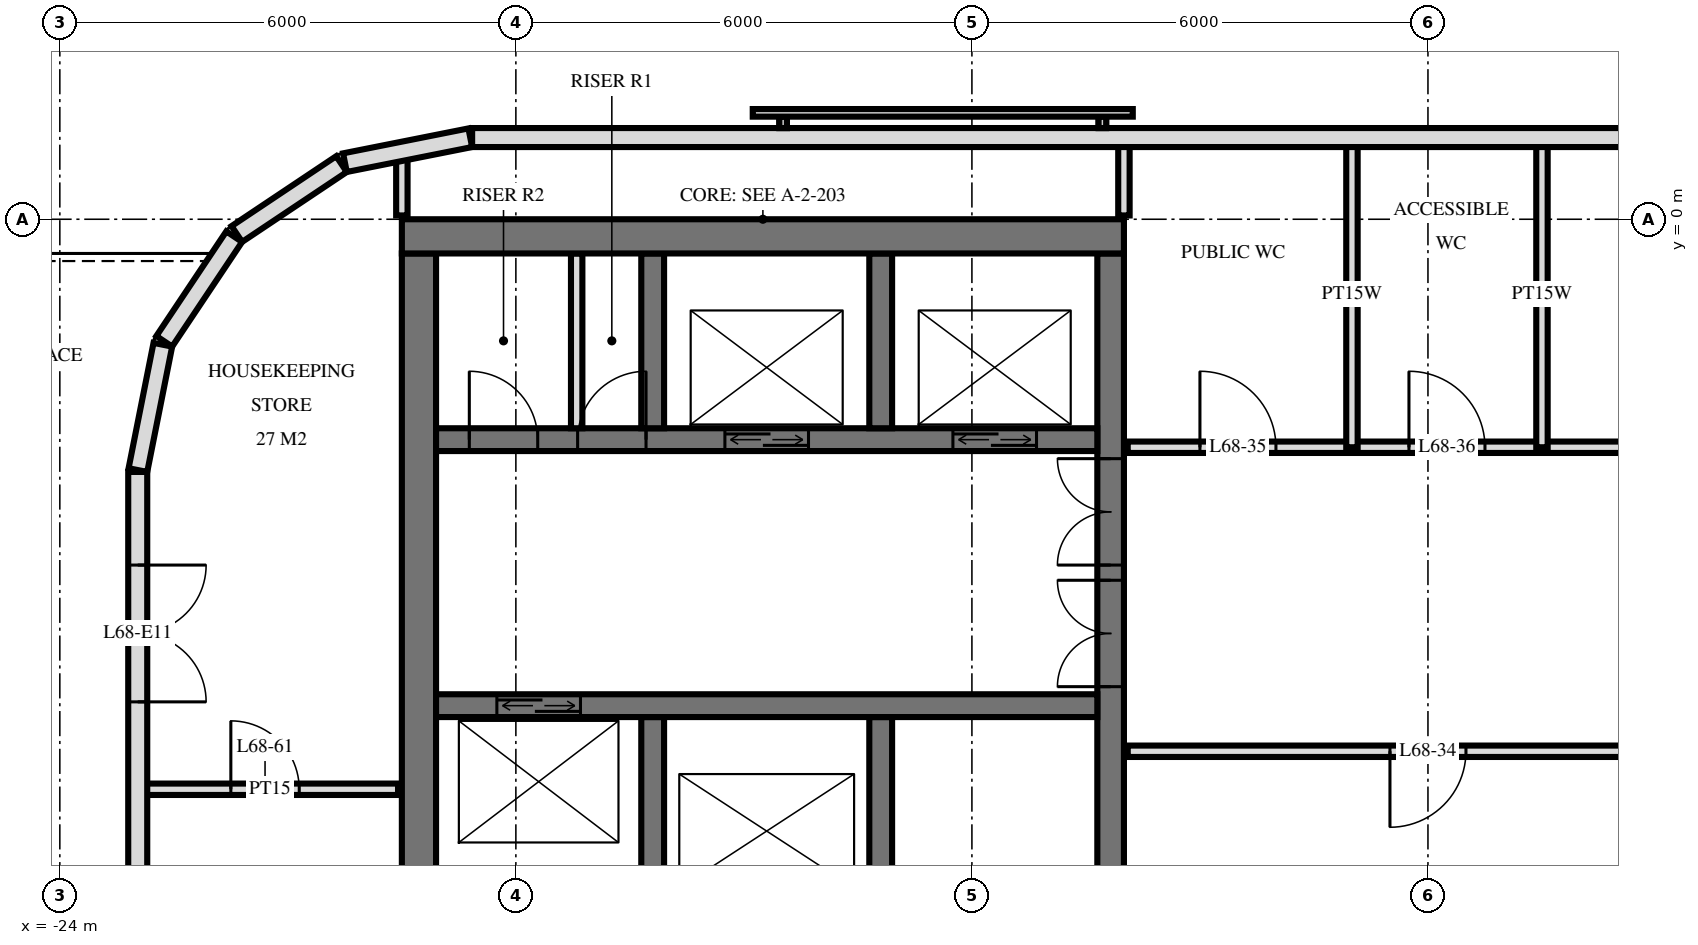
"""IFC4 building model, lengths in metres.
Left out: names, types, materials, properties, quantities, classifications, styles, units other than length and angle.
Written with IfcOpenShell. Run it as: python <this file> out.ifc"""

import sys

from ifc_helpers import new_model, si_unit, direction, frame, frame_2d, origin, place, context, subcontext, project, spatial, rectangle, extrude, element, fill, save


model = new_model("IFC4")
c1 = context("Model", 3, precision=1e-05, world=origin(), true_north=direction((0.0, 1.0)))
c2 = subcontext(c1, "Body", "Model", "MODEL_VIEW")
j1 = project(units=[si_unit("LENGTHUNIT", "METRE"), si_unit("PLANEANGLEUNIT", "RADIAN")], contexts=[c1])
p1 = place(None, origin())
s1 = spatial("IfcSite", under=j1, at=p1, CompositionType="ELEMENT")
p2 = place(p1, origin())
s2 = spatial("IfcBuilding", under=s1, at=p2, CompositionType="ELEMENT")
p3 = place(p2, frame((0.0, 0.0, 259.6)))
s3 = spatial("IfcBuildingStorey", under=s2, at=p3, CompositionType="ELEMENT", Elevation=259.6)
p4 = place(p3, frame((-19.5, -0.225, 0.0), z_axis=(0.0, 0.0, 1.0), x_axis=(1.0, 0.0, 0.0)))
e1 = element("IfcWall", 1, at=p4, inside=s3, PredefinedType="SHEAR", context=c2, shape_type="SweptSolid", body=[
    extrude(rectangle(XDim=9.5, YDim=0.45, at=frame_2d((4.75, 0.0))), origin(), (0.0, 0.0, 1.0), 3.5),
])
p5 = place(p3, frame((-10.175, -14.55, 0.0), z_axis=(0.0, 0.0, 1.0), x_axis=(0.0, 1.0, 0.0)))
e2 = element("IfcWall", 2, at=p5, inside=s3, PredefinedType="SHEAR", context=c2, shape_type="SweptSolid", body=[
    extrude(rectangle(XDim=14.1, YDim=0.35, at=frame_2d((7.05, 0.0))), origin(), (0.0, 0.0, 1.0), 3.5),
])
p6 = place(p5, frame((8.4, 0.0, 0.0)))
e3 = element("IfcOpeningElement", 3, at=p6, cuts=e2, PredefinedType="OPENING", context=c2, shape_type="SweptSolid", body=[
    extrude(rectangle(XDim=1.4, YDim=2.4, at=frame_2d((0.7, 1.2))), frame((0.0, 0.185, 0.0), z_axis=(0.0, -1.0, 0.0), x_axis=(1.0, 0.0, 0.0)), (0.0, 0.0, 1.0), 0.37),
])
p7 = place(p5, frame((10.0, 0.0, 0.0)))
e4 = element("IfcOpeningElement", 4, at=p7, cuts=e2, PredefinedType="OPENING", context=c2, shape_type="SweptSolid", body=[
    extrude(rectangle(XDim=1.4, YDim=2.4, at=frame_2d((0.7, 1.2))), frame((0.0, 0.185, 0.0), z_axis=(0.0, -1.0, 0.0), x_axis=(1.0, 0.0, 0.0)), (0.0, 0.0, 1.0), 0.37),
])
p8 = place(p5, frame((4.0, 0.0, 0.0)))
e5 = element("IfcOpeningElement", 5, at=p8, cuts=e2, PredefinedType="OPENING", context=c2, shape_type="SweptSolid", body=[
    extrude(rectangle(XDim=1.2, YDim=2.1, at=frame_2d((0.6, 1.05))), frame((0.0, 0.185, 0.0), z_axis=(0.0, -1.0, 0.0), x_axis=(1.0, 0.0, 0.0)), (0.0, 0.0, 1.0), 0.37),
])
p9 = place(p3, frame((-19.275, -14.55, 0.0), z_axis=(0.0, 0.0, 1.0), x_axis=(0.0, 1.0, 0.0)))
e6 = element("IfcWall", 6, at=p9, inside=s3, PredefinedType="SHEAR", context=c2, shape_type="SweptSolid", body=[
    extrude(rectangle(XDim=14.1, YDim=0.45, at=frame_2d((7.05, 0.0))), origin(), (0.0, 0.0, 1.0), 3.5),
])
p10 = place(p3, frame((-19.05, -2.9, 0.0), z_axis=(0.0, 0.0, 1.0), x_axis=(1.0, 0.0, 0.0)))
e7 = element("IfcWall", 7, at=p10, inside=s3, PredefinedType="SHEAR", context=c2, shape_type="SweptSolid", body=[
    extrude(rectangle(XDim=8.7, YDim=0.3, at=frame_2d((4.35, 0.0))), origin(), (0.0, 0.0, 1.0), 3.5),
])
p11 = place(p10, frame((6.8, 0.0, 0.0)))
e8 = element("IfcOpeningElement", 8, at=p11, cuts=e7, PredefinedType="OPENING", context=c2, shape_type="SweptSolid", body=[
    extrude(rectangle(XDim=1.1, YDim=2.1, at=frame_2d((0.55, 1.05))), frame((0.0, 0.16, 0.0), z_axis=(0.0, -1.0, 0.0), x_axis=(1.0, 0.0, 0.0)), (0.0, 0.0, 1.0), 0.32),
])
p12 = place(p10, frame((3.8, 0.0, 0.0)))
e9 = element("IfcOpeningElement", 9, at=p12, cuts=e7, PredefinedType="OPENING", context=c2, shape_type="SweptSolid", body=[
    extrude(rectangle(XDim=1.1, YDim=2.1, at=frame_2d((0.55, 1.05))), frame((0.0, 0.16, 0.0), z_axis=(0.0, -1.0, 0.0), x_axis=(1.0, 0.0, 0.0)), (0.0, 0.0, 1.0), 0.32),
])
p13 = place(p10, frame((1.863, 0.0, 0.0)))
e10 = element("IfcOpeningElement", 10, at=p13, cuts=e7, PredefinedType="OPENING", context=c2, shape_type="SweptSolid", body=[
    extrude(rectangle(XDim=0.9, YDim=2.1, at=frame_2d((0.45, 1.05))), frame((0.0, 0.16, 0.0), z_axis=(0.0, -1.0, 0.0), x_axis=(1.0, 0.0, 0.0)), (0.0, 0.0, 1.0), 0.32),
])
p14 = place(p10, frame((0.438, 0.0, 0.0)))
e11 = element("IfcOpeningElement", 11, at=p14, cuts=e7, PredefinedType="OPENING", context=c2, shape_type="SweptSolid", body=[
    extrude(rectangle(XDim=0.9, YDim=2.1, at=frame_2d((0.45, 1.05))), frame((0.0, 0.16, 0.0), z_axis=(0.0, -1.0, 0.0), x_axis=(1.0, 0.0, 0.0)), (0.0, 0.0, 1.0), 0.32),
])
p15 = place(p3, frame((-19.05, -6.4, 0.0), z_axis=(0.0, 0.0, 1.0), x_axis=(1.0, 0.0, 0.0)))
e12 = element("IfcWall", 12, at=p15, inside=s3, PredefinedType="SHEAR", context=c2, shape_type="SweptSolid", body=[
    extrude(rectangle(XDim=8.7, YDim=0.3, at=frame_2d((4.35, 0.0))), origin(), (0.0, 0.0, 1.0), 3.5),
])
p16 = place(p15, frame((0.8, 0.0, 0.0)))
e13 = element("IfcOpeningElement", 13, at=p16, cuts=e12, PredefinedType="OPENING", context=c2, shape_type="SweptSolid", body=[
    extrude(rectangle(XDim=1.1, YDim=2.1, at=frame_2d((0.55, 1.05))), frame((0.0, 0.16, 0.0), z_axis=(0.0, -1.0, 0.0), x_axis=(1.0, 0.0, 0.0)), (0.0, 0.0, 1.0), 0.32),
])
for number, where, z_axis, x_axis in (
    (14, (-13.2, -2.75, 0.0), (0.0, 0.0, 1.0), (0.0, 1.0, 0.0)),
    (15, (-13.2, -8.85, 0.0), (0.0, 0.0, 1.0), (0.0, 1.0, 0.0)),
    (16, (-16.2, -2.75, 0.0), (0.0, 0.0, 1.0), (0.0, 1.0, 0.0)),
    (17, (-16.2, -8.85, 0.0), (0.0, 0.0, 1.0), (0.0, 1.0, 0.0)),
):
    element("IfcWall", number, at=place(p3, frame(where, z_axis=z_axis, x_axis=x_axis)), inside=s3, PredefinedType="SHEAR", context=c2, shape_type="SweptSolid", body=[
        extrude(rectangle(XDim=2.3, YDim=0.3, at=frame_2d((1.15, 0.0))), origin(), (0.0, 0.0, 1.0), 3.5),
    ])
p17 = place(p3, frame((18.575, 1.075, 0.0), z_axis=(0.0, 0.0, 1.0), x_axis=(-1.0, 0.0, 0.0)))
e18 = element("IfcWall", 18, at=p17, inside=s3, PredefinedType="SOLIDWALL", context=c2, shape_type="SweptSolid", body=[
    extrude(rectangle(XDim=37.151, YDim=0.25, at=frame_2d((18.575, 0.0))), origin(), (0.0, 0.0, 1.0), 3.22),
])
p18 = place(p17, frame((9.275, 0.0, 0.9)))
e19 = element("IfcOpeningElement", 19, at=p18, cuts=e18, PredefinedType="OPENING", context=c2, shape_type="SweptSolid", body=[
    extrude(rectangle(XDim=2.4, YDim=1.5, at=frame_2d((1.2, 0.75))), frame((0.0, 0.135, 0.0), z_axis=(0.0, -1.0, 0.0), x_axis=(1.0, 0.0, 0.0)), (0.0, 0.0, 1.0), 0.27),
])
p19 = place(p17, frame((12.275, 0.0, 0.9)))
e20 = element("IfcOpeningElement", 20, at=p19, cuts=e18, PredefinedType="OPENING", context=c2, shape_type="SweptSolid", body=[
    extrude(rectangle(XDim=2.4, YDim=1.5, at=frame_2d((1.2, 0.75))), frame((0.0, 0.135, 0.0), z_axis=(0.0, -1.0, 0.0), x_axis=(1.0, 0.0, 0.0)), (0.0, 0.0, 1.0), 0.27),
])
p20 = place(p17, frame((18.275, 0.0, 0.9)))
e21 = element("IfcOpeningElement", 21, at=p20, cuts=e18, PredefinedType="OPENING", context=c2, shape_type="SweptSolid", body=[
    extrude(rectangle(XDim=2.4, YDim=1.5, at=frame_2d((1.2, 0.75))), frame((0.0, 0.135, 0.0), z_axis=(0.0, -1.0, 0.0), x_axis=(1.0, 0.0, 0.0)), (0.0, 0.0, 1.0), 0.27),
])
p21 = place(p3, frame((-18.6, 1.073, 0.0), z_axis=(0.0, 0.0, 1.0), x_axis=(-0.980797896849, -0.195026884138, 0.0)))
e22 = element("IfcWall", 22, at=p21, inside=s3, PredefinedType="SOLIDWALL", context=c2, shape_type="SweptSolid", body=[
    extrude(rectangle(XDim=1.681, YDim=0.25, at=frame_2d((0.841, 0.0))), origin(), (0.0, 0.0, 1.0), 3.22),
])
for number, where, z_axis, x_axis in (
    (23, (-20.294, 0.726, 0.0), (0.0, 0.0, 1.0), (-0.831, -0.556, 0.0)),
    (24, (-21.706, -0.229, 0.0), (0.0, 0.0, 1.0), (-0.556, -0.831, 0.0)),
):
    element("IfcWall", number, at=place(p3, frame(where, z_axis=z_axis, x_axis=x_axis)), inside=s3, PredefinedType="SOLIDWALL", context=c2, shape_type="SweptSolid", body=[
        extrude(rectangle(XDim=1.656, YDim=0.25, at=frame_2d((0.828, 0.0))), origin(), (0.0, 0.0, 1.0), 3.22),
    ])
p22 = place(p3, frame((-22.645, -1.651, 0.0), z_axis=(0.0, 0.0, 1.0), x_axis=(-0.19513878023, -0.980775640221, 0.0)))
e25 = element("IfcWall", 25, at=p22, inside=s3, PredefinedType="SOLIDWALL", context=c2, shape_type="SweptSolid", body=[
    extrude(rectangle(XDim=1.681, YDim=0.25, at=frame_2d((0.841, 0.0))), origin(), (0.0, 0.0, 1.0), 3.22),
])
p23 = place(p3, frame((-22.975, -3.325, 0.0), z_axis=(0.0, 0.0, 1.0), x_axis=(0.0, -1.0, 0.0)))
e26 = element("IfcWall", 26, at=p23, inside=s3, PredefinedType="SOLIDWALL", context=c2, shape_type="SweptSolid", body=[
    extrude(rectangle(XDim=25.951, YDim=0.25, at=frame_2d((12.975, 0.0))), origin(), (0.0, 0.0, 1.0), 3.22),
])
p24 = place(p23, frame((1.225, 0.0, 0.0)))
e27 = element("IfcOpeningElement", 27, at=p24, cuts=e26, PredefinedType="OPENING", context=c2, shape_type="SweptSolid", body=[
    extrude(rectangle(XDim=1.8, YDim=2.4, at=frame_2d((0.9, 1.2))), frame((0.0, 0.135, 0.0), z_axis=(0.0, -1.0, 0.0), x_axis=(1.0, 0.0, 0.0)), (0.0, 0.0, 1.0), 0.27),
])
p25 = place(p23, frame((7.975, 0.0, 0.0)))
e28 = element("IfcOpeningElement", 28, at=p25, cuts=e26, PredefinedType="OPENING", context=c2, shape_type="SweptSolid", body=[
    extrude(rectangle(XDim=1.8, YDim=2.4, at=frame_2d((0.9, 1.2))), frame((0.0, 0.135, 0.0), z_axis=(0.0, -1.0, 0.0), x_axis=(1.0, 0.0, 0.0)), (0.0, 0.0, 1.0), 0.27),
])
p26 = place(p23, frame((18.175, 0.0, 0.0)))
e29 = element("IfcOpeningElement", 29, at=p26, cuts=e26, PredefinedType="OPENING", context=c2, shape_type="SweptSolid", body=[
    extrude(rectangle(XDim=1.8, YDim=2.4, at=frame_2d((0.9, 1.2))), frame((0.0, 0.135, 0.0), z_axis=(0.0, -1.0, 0.0), x_axis=(1.0, 0.0, 0.0)), (0.0, 0.0, 1.0), 0.27),
])
p27 = place(p23, frame((21.075, 0.0, 0.0)))
e30 = element("IfcOpeningElement", 30, at=p27, cuts=e26, PredefinedType="OPENING", context=c2, shape_type="SweptSolid", body=[
    extrude(rectangle(XDim=1.8, YDim=2.4, at=frame_2d((0.9, 1.2))), frame((0.0, 0.135, 0.0), z_axis=(0.0, -1.0, 0.0), x_axis=(1.0, 0.0, 0.0)), (0.0, 0.0, 1.0), 0.27),
])
p28 = place(p23, frame((23.825, 0.0, 0.9)))
e31 = element("IfcOpeningElement", 31, at=p28, cuts=e26, PredefinedType="OPENING", context=c2, shape_type="SweptSolid", body=[
    extrude(rectangle(XDim=1.8, YDim=1.5, at=frame_2d((0.9, 0.75))), frame((0.0, 0.135, 0.0), z_axis=(0.0, -1.0, 0.0), x_axis=(1.0, 0.0, 0.0)), (0.0, 0.0, 1.0), 0.27),
])
p29 = place(p3, frame((-17.2, -2.75, 0.0), z_axis=(0.0, 0.0, 1.0), x_axis=(0.0, 1.0, 0.0)))
e32 = element("IfcWall", 32, at=p29, inside=s3, PredefinedType="PARTITIONING", context=c2, shape_type="SweptSolid", body=[
    extrude(rectangle(XDim=2.3, YDim=0.15, at=frame_2d((1.15, 0.0))), origin(), (0.0, 0.0, 1.0), 3.2),
])
for number, where, z_axis, x_axis in (
    (33, (-4.5, -3.0, 0.0), (0.0, 0.0, 1.0), (0.0, 1.0, 0.0)),
    (34, (-7.0, -3.0, 0.0), (0.0, 0.0, 1.0), (0.0, 1.0, 0.0)),
):
    element("IfcWall", number, at=place(p3, frame(where, z_axis=z_axis, x_axis=x_axis)), inside=s3, PredefinedType="PLUMBINGWALL", context=c2, shape_type="SweptSolid", body=[
        extrude(rectangle(XDim=4.02, YDim=0.15, at=frame_2d((2.01, 0.0))), origin(), (0.0, 0.0, 1.0), 3.22),
    ])
p30 = place(p3, frame((-10.0, 0.05, 0.0), z_axis=(0.0, 0.0, 1.0), x_axis=(0.0, 1.0, 0.0)))
e35 = element("IfcWall", 35, at=p30, inside=s3, PredefinedType="PLUMBINGWALL", context=c2, shape_type="SweptSolid", body=[
    extrude(rectangle(XDim=0.97, YDim=0.15, at=frame_2d((0.485, 0.0))), origin(), (0.0, 0.0, 1.0), 3.22),
])
p31 = place(p3, frame((-19.5, 0.05, 0.0), z_axis=(0.0, 0.0, 1.0), x_axis=(0.0, 1.0, 0.0)))
e36 = element("IfcWall", 36, at=p31, inside=s3, PredefinedType="PARTITIONING", context=c2, shape_type="SweptSolid", body=[
    extrude(rectangle(XDim=0.787, YDim=0.15, at=frame_2d((0.394, 0.0))), origin(), (0.0, 0.0, 1.0), 3.22),
])
p32 = place(p3, frame((-22.92, -7.5, 0.0), z_axis=(0.0, 0.0, 1.0), x_axis=(1.0, 0.0, 0.0)))
e37 = element("IfcWall", 37, at=p32, inside=s3, PredefinedType="PARTITIONING", context=c2, shape_type="SweptSolid", body=[
    extrude(rectangle(XDim=3.37, YDim=0.15, at=frame_2d((1.685, 0.0))), origin(), (0.0, 0.0, 1.0), 3.22),
])
p33 = place(p32, frame((1.17, 0.0, 0.0)))
e38 = element("IfcOpeningElement", 38, at=p33, cuts=e37, PredefinedType="OPENING", context=c2, shape_type="SweptSolid", body=[
    extrude(rectangle(XDim=0.9, YDim=2.1, at=frame_2d((0.45, 1.05))), frame((0.0, 0.085, 0.0), z_axis=(0.0, -1.0, 0.0), x_axis=(1.0, 0.0, 0.0)), (0.0, 0.0, 1.0), 0.17),
])
p34 = place(p3, frame((-9.95, -7.0, 0.0), z_axis=(0.0, 0.0, 1.0), x_axis=(1.0, 0.0, 0.0)))
e39 = element("IfcWall", 39, at=p34, inside=s3, PredefinedType="PARTITIONING", context=c2, shape_type="SweptSolid", body=[
    extrude(rectangle(XDim=19.9, YDim=0.15, at=frame_2d((9.95, 0.0))), origin(), (0.0, 0.0, 1.0), 3.22),
])
p35 = place(p34, frame((9.45, 0.0, 0.0)))
e40 = element("IfcOpeningElement", 40, at=p35, cuts=e39, PredefinedType="OPENING", context=c2, shape_type="SweptSolid", body=[
    extrude(rectangle(XDim=1.0, YDim=2.1, at=frame_2d((0.5, 1.05))), frame((0.0, 0.085, 0.0), z_axis=(0.0, -1.0, 0.0), x_axis=(1.0, 0.0, 0.0)), (0.0, 0.0, 1.0), 0.17),
])
p36 = place(p34, frame((3.45, 0.0, 0.0)))
e41 = element("IfcOpeningElement", 41, at=p36, cuts=e39, PredefinedType="OPENING", context=c2, shape_type="SweptSolid", body=[
    extrude(rectangle(XDim=1.0, YDim=2.1, at=frame_2d((0.5, 1.05))), frame((0.0, 0.085, 0.0), z_axis=(0.0, -1.0, 0.0), x_axis=(1.0, 0.0, 0.0)), (0.0, 0.0, 1.0), 0.17),
])
p37 = place(p3, frame((-9.95, -3.0, 0.0), z_axis=(0.0, 0.0, 1.0), x_axis=(1.0, 0.0, 0.0)))
e42 = element("IfcWall", 42, at=p37, inside=s3, PredefinedType="PARTITIONING", context=c2, shape_type="SweptSolid", body=[
    extrude(rectangle(XDim=19.9, YDim=0.15, at=frame_2d((9.95, 0.0))), origin(), (0.0, 0.0, 1.0), 3.22),
])
p38 = place(p37, frame((0.95, 0.0, 0.0)))
e43 = element("IfcOpeningElement", 43, at=p38, cuts=e42, PredefinedType="OPENING", context=c2, shape_type="SweptSolid", body=[
    extrude(rectangle(XDim=1.0, YDim=2.1, at=frame_2d((0.5, 1.05))), frame((0.0, 0.085, 0.0), z_axis=(0.0, -1.0, 0.0), x_axis=(1.0, 0.0, 0.0)), (0.0, 0.0, 1.0), 0.17),
])
p39 = place(p37, frame((3.7, 0.0, 0.0)))
e44 = element("IfcOpeningElement", 44, at=p39, cuts=e42, PredefinedType="OPENING", context=c2, shape_type="SweptSolid", body=[
    extrude(rectangle(XDim=1.0, YDim=2.1, at=frame_2d((0.5, 1.05))), frame((0.0, 0.085, 0.0), z_axis=(0.0, -1.0, 0.0), x_axis=(1.0, 0.0, 0.0)), (0.0, 0.0, 1.0), 0.17),
])
p40 = place(p37, frame((8.45, 0.0, 0.0)))
e45 = element("IfcOpeningElement", 45, at=p40, cuts=e42, PredefinedType="OPENING", context=c2, shape_type="SweptSolid", body=[
    extrude(rectangle(XDim=1.0, YDim=2.1, at=frame_2d((0.5, 1.05))), frame((0.0, 0.085, 0.0), z_axis=(0.0, -1.0, 0.0), x_axis=(1.0, 0.0, 0.0)), (0.0, 0.0, 1.0), 0.17),
])
p41 = place(p37, frame((15.7, 0.0, 0.0)))
e46 = element("IfcOpeningElement", 46, at=p41, cuts=e42, PredefinedType="OPENING", context=c2, shape_type="SweptSolid", body=[
    extrude(rectangle(XDim=1.0, YDim=2.1, at=frame_2d((0.5, 1.05))), frame((0.0, 0.085, 0.0), z_axis=(0.0, -1.0, 0.0), x_axis=(1.0, 0.0, 0.0)), (0.0, 0.0, 1.0), 0.17),
])
p42 = place(p24, origin())
e47 = element("IfcDoor", 47, at=p42, inside=s3, OperationType="DOUBLE_DOOR_SINGLE_SWING", PredefinedType="DOOR", context=c2, shape_type="SweptSolid", body=[
    extrude(rectangle(XDim=1.8, YDim=2.4, at=frame_2d((0.9, 1.2))), frame((0.0, 0.025, 0.0), z_axis=(0.0, -1.0, 0.0), x_axis=(1.0, 0.0, 0.0)), (0.0, 0.0, 1.0), 0.05),
])
fill(e27, e47)
p43 = place(p11, origin())
e48 = element("IfcDoor", 48, at=p43, inside=s3, OperationType="DOUBLE_DOOR_SLIDING", PredefinedType="USERDEFINED", context=c2, shape_type="SweptSolid", body=[
    extrude(rectangle(XDim=1.1, YDim=2.1, at=frame_2d((0.55, 1.05))), frame((0.0, 0.025, 0.0), z_axis=(0.0, -1.0, 0.0), x_axis=(1.0, 0.0, 0.0)), (0.0, 0.0, 1.0), 0.05),
])
fill(e8, e48)
p44 = place(p12, origin())
e49 = element("IfcDoor", 49, at=p44, inside=s3, OperationType="DOUBLE_DOOR_SLIDING", PredefinedType="USERDEFINED", context=c2, shape_type="SweptSolid", body=[
    extrude(rectangle(XDim=1.1, YDim=2.1, at=frame_2d((0.55, 1.05))), frame((0.0, 0.025, 0.0), z_axis=(0.0, -1.0, 0.0), x_axis=(1.0, 0.0, 0.0)), (0.0, 0.0, 1.0), 0.05),
])
fill(e9, e49)
p45 = place(p16, origin())
e50 = element("IfcDoor", 50, at=p45, inside=s3, OperationType="DOUBLE_DOOR_SLIDING", PredefinedType="USERDEFINED", context=c2, shape_type="SweptSolid", body=[
    extrude(rectangle(XDim=1.1, YDim=2.1, at=frame_2d((0.55, 1.05))), frame((0.0, 0.025, 0.0), z_axis=(0.0, -1.0, 0.0), x_axis=(1.0, 0.0, 0.0)), (0.0, 0.0, 1.0), 0.05),
])
fill(e13, e50)
p46 = place(p6, origin())
e51 = element("IfcDoor", 51, at=p46, inside=s3, OperationType="DOUBLE_DOOR_SINGLE_SWING", PredefinedType="DOOR", context=c2, shape_type="SweptSolid", body=[
    extrude(rectangle(XDim=1.4, YDim=2.4, at=frame_2d((0.7, 1.2))), frame((0.0, 0.025, 0.0), z_axis=(0.0, -1.0, 0.0), x_axis=(1.0, 0.0, 0.0)), (0.0, 0.0, 1.0), 0.05),
])
fill(e3, e51)
p47 = place(p7, origin())
e52 = element("IfcDoor", 52, at=p47, inside=s3, OperationType="DOUBLE_DOOR_SINGLE_SWING", PredefinedType="DOOR", context=c2, shape_type="SweptSolid", body=[
    extrude(rectangle(XDim=1.4, YDim=2.4, at=frame_2d((0.7, 1.2))), frame((0.0, 0.025, 0.0), z_axis=(0.0, -1.0, 0.0), x_axis=(1.0, 0.0, 0.0)), (0.0, 0.0, 1.0), 0.05),
])
fill(e4, e52)
p48 = place(p13, origin())
e53 = element("IfcDoor", 53, at=p48, inside=s3, OperationType="SINGLE_SWING_LEFT", PredefinedType="DOOR", context=c2, shape_type="SweptSolid", body=[
    extrude(rectangle(XDim=0.9, YDim=2.1, at=frame_2d((0.45, 1.05))), frame((0.0, 0.025, 0.0), z_axis=(0.0, -1.0, 0.0), x_axis=(1.0, 0.0, 0.0)), (0.0, 0.0, 1.0), 0.05),
])
fill(e10, e53)
p49 = place(p14, origin())
e54 = element("IfcDoor", 54, at=p49, inside=s3, OperationType="SINGLE_SWING_RIGHT", PredefinedType="DOOR", context=c2, shape_type="SweptSolid", body=[
    extrude(rectangle(XDim=0.9, YDim=2.1, at=frame_2d((0.45, 1.05))), frame((0.0, 0.025, 0.0), z_axis=(0.0, -1.0, 0.0), x_axis=(1.0, 0.0, 0.0)), (0.0, 0.0, 1.0), 0.05),
])
fill(e11, e54)
p50 = place(p36, frame((0.5, 0.0, 0.0), z_axis=(0.0, 0.0, 1.0), x_axis=(-1.0, 0.0, 0.0)))
e55 = element("IfcDoor", 55, at=p50, inside=s3, OperationType="SINGLE_SWING_LEFT", PredefinedType="DOOR", context=c2, shape_type="SweptSolid", body=[
    extrude(rectangle(XDim=1.0, YDim=2.1, at=frame_2d((0.0, 1.05))), frame((0.0, -0.025, 0.0), z_axis=(0.0, 1.0, 0.0), x_axis=(-1.0, 0.0, 0.0)), (0.0, 0.0, 1.0), 0.05),
])
fill(e41, e55)
p51 = place(p38, origin())
e56 = element("IfcDoor", 56, at=p51, inside=s3, OperationType="SINGLE_SWING_RIGHT", PredefinedType="DOOR", context=c2, shape_type="SweptSolid", body=[
    extrude(rectangle(XDim=1.0, YDim=2.1, at=frame_2d((0.5, 1.05))), frame((0.0, 0.025, 0.0), z_axis=(0.0, -1.0, 0.0), x_axis=(1.0, 0.0, 0.0)), (0.0, 0.0, 1.0), 0.05),
])
fill(e43, e56)
p52 = place(p39, origin())
e57 = element("IfcDoor", 57, at=p52, inside=s3, OperationType="SINGLE_SWING_RIGHT", PredefinedType="DOOR", context=c2, shape_type="SweptSolid", body=[
    extrude(rectangle(XDim=1.0, YDim=2.1, at=frame_2d((0.5, 1.05))), frame((0.0, 0.025, 0.0), z_axis=(0.0, -1.0, 0.0), x_axis=(1.0, 0.0, 0.0)), (0.0, 0.0, 1.0), 0.05),
])
fill(e44, e57)
p53 = place(p33, origin())
e58 = element("IfcDoor", 58, at=p53, inside=s3, OperationType="SINGLE_SWING_RIGHT", PredefinedType="DOOR", context=c2, shape_type="SweptSolid", body=[
    extrude(rectangle(XDim=0.9, YDim=2.1, at=frame_2d((0.45, 1.05))), frame((0.0, 0.025, 0.0), z_axis=(0.0, -1.0, 0.0), x_axis=(1.0, 0.0, 0.0)), (0.0, 0.0, 1.0), 0.05),
])
fill(e38, e58)
save(model, sys.argv[1])
